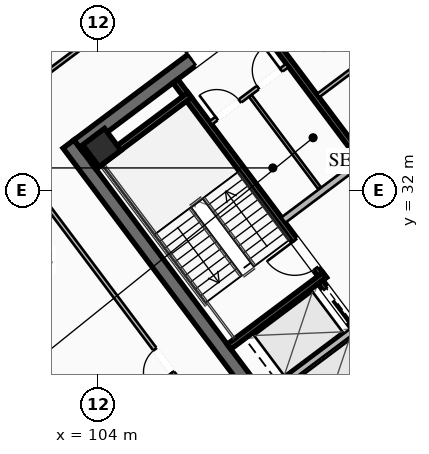
"""IFC4 building model, lengths in metres.
Left out: names, types, materials, properties, quantities, classifications, styles, units other than length and angle.
Written with IfcOpenShell. Run it as: python <this file> out.ifc"""

import sys

from ifc_helpers import new_model, si_unit, direction, frame, frame_2d, origin, origin_2d, place, context, subcontext, project, spatial, rectangle, hollow_rectangle, extrude, element, fill, save


model = new_model("IFC4")
c1 = context("Model", 3, precision=1e-05, world=origin(), true_north=direction((0.0, 1.0)))
c2 = subcontext(c1, "Body", "Model", "MODEL_VIEW")
j1 = project(units=[si_unit("LENGTHUNIT", "METRE"), si_unit("PLANEANGLEUNIT", "RADIAN")], contexts=[c1])
p1 = place(None, origin())
s1 = spatial("IfcSite", under=j1, at=p1, CompositionType="ELEMENT")
p2 = place(p1, origin())
s2 = spatial("IfcBuilding", under=s1, at=p2, CompositionType="ELEMENT")
p3 = place(p2, frame((0.0, 0.0, 255.4)))
s3 = spatial("IfcBuildingStorey", under=s2, at=p3, CompositionType="ELEMENT", Elevation=255.4)
p4 = place(p3, frame((112.396, 21.047, 0.0), z_axis=(0.0, 0.0, 1.0), x_axis=(-0.600005007985, 0.799996243986, 0.0)))
e1 = element("IfcWall", 1, at=p4, inside=s3, PredefinedType="SHEAR", context=c2, shape_type="SweptSolid", body=[
    extrude(rectangle(XDim=15.6, YDim=0.45, at=frame_2d((7.8, 0.0))), origin(), (0.0, 0.0, 1.0), 4.0),
])
p5 = place(p3, frame((103.351, 33.482, 0.0), z_axis=(0.0, 0.0, 1.0), x_axis=(0.8, 0.6, 0.0)))
e2 = element("IfcWall", 2, at=p5, inside=s3, PredefinedType="SHEAR", context=c2, shape_type="SweptSolid", body=[
    extrude(rectangle(XDim=15.26, YDim=0.45, at=frame_2d((7.63, 0.0))), origin(), (0.0, 0.0, 1.0), 4.0),
])
p6 = place(p5, frame((4.68, 0.0, 0.0)))
e3 = element("IfcOpeningElement", 3, at=p6, cuts=e2, PredefinedType="OPENING", context=c2, shape_type="SweptSolid", body=[
    extrude(rectangle(XDim=1.25, YDim=2.25, at=frame_2d((0.625, 1.125))), frame((0.0, 0.235, 0.0), z_axis=(0.0, -1.0, 0.0), x_axis=(1.0, 0.0, 0.0)), (0.0, 0.0, 1.0), 0.47),
])
p7 = place(p5, frame((9.73, 0.0, 0.0)))
e4 = element("IfcOpeningElement", 4, at=p7, cuts=e2, PredefinedType="OPENING", context=c2, shape_type="SweptSolid", body=[
    extrude(rectangle(XDim=1.25, YDim=2.25, at=frame_2d((0.625, 1.125))), frame((0.0, 0.235, 0.0), z_axis=(0.0, -1.0, 0.0), x_axis=(1.0, 0.0, 0.0)), (0.0, 0.0, 1.0), 0.47),
])
p8 = place(p3, frame((104.13, 33.41, 0.0), z_axis=(0.0, 0.0, 1.0), x_axis=(0.799999996291, 0.600000004945, 0.0)))
e5 = element("IfcColumn", 5, at=p8, inside=s3, PredefinedType="COLUMN", context=c2, shape_type="SweptSolid", body=[
    extrude(hollow_rectangle(XDim=0.9, YDim=0.9, WallThickness=0.04, at=origin_2d()), origin(), (0.0, 0.0, 1.0), 3.78),
])
p9 = place(p3, frame((111.44, 29.08, 0.0), z_axis=(0.0, 0.0, 1.0), x_axis=(-0.59999041401, 0.800007189403, 0.0)))
e6 = element("IfcWall", 6, at=p9, inside=s3, PredefinedType="SHEAR", context=c2, shape_type="SweptSolid", body=[
    extrude(rectangle(XDim=8.15, YDim=0.2, at=frame_2d((4.075, 0.0))), origin(), (0.0, 0.0, 1.0), 3.78),
])
p10 = place(p9, frame((0.45, 0.0, 0.0)))
e7 = element("IfcOpeningElement", 7, at=p10, cuts=e6, PredefinedType="OPENING", context=c2, shape_type="SweptSolid", body=[
    extrude(rectangle(XDim=1.15, YDim=2.2, at=frame_2d((0.575, 1.1))), frame((0.0, 0.11, 0.0), z_axis=(0.0, -1.0, 0.0), x_axis=(1.0, 0.0, 0.0)), (0.0, 0.0, 1.0), 0.22),
])
for number, where, z_axis, x_axis in (
    (8, (108.316, 26.862, 0.0), (0.0, 0.0, 1.0), (0.8, 0.6, 0.0)),
    (9, (103.876, 32.782, 0.0), (0.0, 0.0, 1.0), (0.8, 0.6, 0.0)),
):
    element("IfcWall", number, at=place(p3, frame(where, z_axis=z_axis, x_axis=x_axis)), inside=s3, PredefinedType="SHEAR", context=c2, shape_type="SweptSolid", body=[
        extrude(rectangle(XDim=3.93, YDim=0.2, at=frame_2d((1.965, 0.0))), origin(), (0.0, 0.0, 1.0), 3.78),
    ])
p11 = place(p3, frame((118.058, 25.856, 0.0), z_axis=(0.0, 0.0, 1.0), x_axis=(-0.600002657301, 0.799998007018, 0.0)))
e10 = element("IfcWall", 10, at=p11, inside=s3, PredefinedType="SHEAR", context=c2, shape_type="SweptSolid", body=[
    extrude(rectangle(XDim=14.7, YDim=0.2, at=frame_2d((7.35, 0.0))), origin(), (0.0, 0.0, 1.0), 3.78),
])
p12 = place(p3, frame((110.104, 31.028, 0.0), z_axis=(0.0, 0.0, 1.0), x_axis=(0.800018601094, 0.59997519774, 0.0)))
e11 = element("IfcWall", 11, at=p12, inside=s3, PredefinedType="SOLIDWALL", context=c2, shape_type="SweptSolid", body=[
    extrude(rectangle(XDim=3.15, YDim=0.22, at=frame_2d((1.575, 0.0))), origin(), (0.0, 0.0, 1.0), 2.971),
])
p13 = place(p3, frame((115.25, 23.75, 0.0), z_axis=(0.0, 0.0, 1.0), x_axis=(-0.599994036198, 0.800004472816, 0.0)))
e12 = element("IfcWall", 12, at=p13, inside=s3, PredefinedType="SHEAR", context=c2, shape_type="SweptSolid", body=[
    extrude(rectangle(XDim=6.55, YDim=0.2, at=frame_2d((3.275, 0.0))), origin(), (0.0, 0.0, 1.0), 3.78),
])
p14 = place(p13, frame((4.975, 0.0, 0.0)))
e13 = element("IfcOpeningElement", 13, at=p14, cuts=e12, PredefinedType="OPENING", context=c2, shape_type="SweptSolid", body=[
    extrude(rectangle(XDim=1.3, YDim=2.25, at=frame_2d((0.65, 1.125))), frame((0.0, 0.11, 0.0), z_axis=(0.0, -1.0, 0.0), x_axis=(1.0, 0.0, 0.0)), (0.0, 0.0, 1.0), 0.22),
])
p15 = place(p13, frame((2.975, 0.0, 0.0)))
e14 = element("IfcOpeningElement", 14, at=p15, cuts=e12, PredefinedType="OPENING", context=c2, shape_type="SweptSolid", body=[
    extrude(rectangle(XDim=1.3, YDim=2.25, at=frame_2d((0.65, 1.125))), frame((0.0, 0.11, 0.0), z_axis=(0.0, -1.0, 0.0), x_axis=(1.0, 0.0, 0.0)), (0.0, 0.0, 1.0), 0.22),
])
p16 = place(p13, frame((0.775, 0.0, 0.0)))
e15 = element("IfcOpeningElement", 15, at=p16, cuts=e12, PredefinedType="OPENING", context=c2, shape_type="SweptSolid", body=[
    extrude(rectangle(XDim=1.3, YDim=2.25, at=frame_2d((0.65, 1.125))), frame((0.0, 0.11, 0.0), z_axis=(0.0, -1.0, 0.0), x_axis=(1.0, 0.0, 0.0)), (0.0, 0.0, 1.0), 0.22),
])
p17 = place(p3, frame((109.528, 25.246, 0.0), z_axis=(0.0, 0.0, 1.0), x_axis=(0.800008183455, 0.599989088572, 0.0)))
e16 = element("IfcWall", 16, at=p17, inside=s3, PredefinedType="SOLIDWALL", context=c2, shape_type="SweptSolid", body=[
    extrude(rectangle(XDim=3.58, YDim=0.2, at=frame_2d((1.79, 0.0))), origin(), (0.0, 0.0, 1.0), 3.78),
])
p18 = place(p3, frame((107.71, 34.22, 0.0), z_axis=(0.0, 0.0, 1.0), x_axis=(0.799981399002, 0.60002480053, 0.0)))
e17 = element("IfcWall", 17, at=p18, inside=s3, PredefinedType="PARTITIONING", context=c2, shape_type="SweptSolid", body=[
    extrude(rectangle(XDim=3.15, YDim=0.135, at=frame_2d((1.575, 0.0))), origin(), (0.0, 0.0, 1.0), 2.971),
])
p19 = place(p18, frame((0.25, 0.0, 0.0)))
e18 = element("IfcOpeningElement", 18, at=p19, cuts=e17, PredefinedType="OPENING", context=c2, shape_type="SweptSolid", body=[
    extrude(rectangle(XDim=0.95, YDim=2.05, at=frame_2d((0.475, 1.025))), frame((0.0, 0.077, 0.0), z_axis=(0.0, -1.0, 0.0), x_axis=(1.0, 0.0, 0.0)), (0.0, 0.0, 1.0), 0.155),
])
p20 = place(p18, frame((1.95, 0.0, 0.0)))
e19 = element("IfcOpeningElement", 19, at=p20, cuts=e17, PredefinedType="OPENING", context=c2, shape_type="SweptSolid", body=[
    extrude(rectangle(XDim=0.95, YDim=2.05, at=frame_2d((0.475, 1.025))), frame((0.0, 0.077, 0.0), z_axis=(0.0, -1.0, 0.0), x_axis=(1.0, 0.0, 0.0)), (0.0, 0.0, 1.0), 0.155),
])
p21 = place(p3, frame((111.296, 32.072, 0.0), z_axis=(0.0, 0.0, 1.0), x_axis=(-0.59995887973, 0.800030838552, 0.0)))
e20 = element("IfcWall", 20, at=p21, inside=s3, PredefinedType="PARTITIONING", context=c2, shape_type="SweptSolid", body=[
    extrude(rectangle(XDim=3.8, YDim=0.11, at=frame_2d((1.9, 0.0))), origin(), (0.0, 0.0, 1.0), 2.971),
])
p22 = place(p3, frame((115.11, 33.27, 0.0), z_axis=(0.0, 0.0, 1.0), x_axis=(-0.600011160345, 0.79999162962, 0.0)))
e21 = element("IfcWall", 21, at=p22, inside=s3, PredefinedType="SOLIDWALL", context=c2, shape_type="SweptSolid", body=[
    extrude(rectangle(XDim=7.0, YDim=0.2, at=frame_2d((3.5, 0.0))), origin(), (0.0, 0.0, 1.0), 2.971),
])
p23 = place(p22, frame((0.85, 0.0, 0.0)))
e22 = element("IfcOpeningElement", 22, at=p23, cuts=e21, PredefinedType="OPENING", context=c2, shape_type="SweptSolid", body=[
    extrude(rectangle(XDim=0.95, YDim=2.05, at=frame_2d((0.475, 1.025))), frame((0.0, 0.11, 0.0), z_axis=(0.0, -1.0, 0.0), x_axis=(1.0, 0.0, 0.0)), (0.0, 0.0, 1.0), 0.22),
])
p24 = place(p22, frame((4.85, 0.0, 0.0)))
e23 = element("IfcOpeningElement", 23, at=p24, cuts=e21, PredefinedType="OPENING", context=c2, shape_type="SweptSolid", body=[
    extrude(rectangle(XDim=0.95, YDim=2.05, at=frame_2d((0.475, 1.025))), frame((0.0, 0.11, 0.0), z_axis=(0.0, -1.0, 0.0), x_axis=(1.0, 0.0, 0.0)), (0.0, 0.0, 1.0), 0.22),
])
p25 = place(p3, frame((111.246, 35.122, 0.0), z_axis=(0.0, 0.0, 1.0), x_axis=(0.8, 0.6, 0.0)))
e24 = element("IfcWall", 24, at=p25, inside=s3, PredefinedType="PARTITIONING", context=c2, shape_type="SweptSolid", body=[
    extrude(rectangle(XDim=1.88, YDim=0.135, at=frame_2d((0.94, 0.0))), origin(), (0.0, 0.0, 1.0), 2.971),
])
p26 = place(p3, frame((100.236, 34.302, 0.0), z_axis=(0.0, 0.0, 1.0), x_axis=(0.799997393501, 0.600003475316, 0.0)))
e25 = element("IfcWall", 25, at=p26, inside=s3, PredefinedType="PARTITIONING", context=c2, shape_type="SweptSolid", body=[
    extrude(rectangle(XDim=22.48, YDim=0.135, at=frame_2d((11.24, 0.0))), origin(), (0.0, 0.0, 1.0), 2.971),
])
p27 = place(p26, frame((0.3, 0.0, 0.0)))
e26 = element("IfcOpeningElement", 26, at=p27, cuts=e25, PredefinedType="OPENING", context=c2, shape_type="SweptSolid", body=[
    extrude(rectangle(XDim=0.95, YDim=2.05, at=frame_2d((0.475, 1.025))), frame((0.0, 0.077, 0.0), z_axis=(0.0, -1.0, 0.0), x_axis=(1.0, 0.0, 0.0)), (0.0, 0.0, 1.0), 0.155),
])
p28 = place(p26, frame((21.23, 0.0, 0.0)))
e27 = element("IfcOpeningElement", 27, at=p28, cuts=e25, PredefinedType="OPENING", context=c2, shape_type="SweptSolid", body=[
    extrude(rectangle(XDim=0.95, YDim=2.05, at=frame_2d((0.475, 1.025))), frame((0.0, 0.077, 0.0), z_axis=(0.0, -1.0, 0.0), x_axis=(1.0, 0.0, 0.0)), (0.0, 0.0, 1.0), 0.155),
])
p29 = place(p3, frame((123.262, 26.984, 0.0), z_axis=(0.0, 0.0, 1.0), x_axis=(-0.799997911818, -0.600002784232, 0.0)))
e28 = element("IfcWall", 28, at=p29, inside=s3, PredefinedType="PARTITIONING", context=c2, shape_type="SweptSolid", body=[
    extrude(rectangle(XDim=14.03, YDim=0.135, at=frame_2d((7.015, 0.0))), origin(), (0.0, 0.0, 1.0), 2.971),
])
p30 = place(p29, frame((4.18, 0.0, 0.0)))
e29 = element("IfcOpeningElement", 29, at=p30, cuts=e28, PredefinedType="OPENING", context=c2, shape_type="SweptSolid", body=[
    extrude(rectangle(XDim=0.95, YDim=2.05, at=frame_2d((0.475, 1.025))), frame((0.0, 0.077, 0.0), z_axis=(0.0, -1.0, 0.0), x_axis=(1.0, 0.0, 0.0)), (0.0, 0.0, 1.0), 0.155),
])
p31 = place(p29, frame((2.47, 0.0, 0.0)))
e30 = element("IfcOpeningElement", 30, at=p31, cuts=e28, PredefinedType="OPENING", context=c2, shape_type="SweptSolid", body=[
    extrude(rectangle(XDim=0.95, YDim=2.05, at=frame_2d((0.475, 1.025))), frame((0.0, 0.077, 0.0), z_axis=(0.0, -1.0, 0.0), x_axis=(1.0, 0.0, 0.0)), (0.0, 0.0, 1.0), 0.155),
])
p32 = place(p3, frame((111.99, 18.63, 0.0), z_axis=(0.0, 0.0, 1.0), x_axis=(-0.599997997836, 0.800001501619, 0.0)))
e31 = element("IfcWall", 31, at=p32, inside=s3, PredefinedType="PARTITIONING", context=c2, shape_type="SweptSolid", body=[
    extrude(rectangle(XDim=19.51, YDim=0.135, at=frame_2d((9.755, 0.0))), origin(), (0.0, 0.0, 1.0), 2.971),
])
p33 = place(p32, frame((0.3, 0.0, 0.0)))
e32 = element("IfcOpeningElement", 32, at=p33, cuts=e31, PredefinedType="OPENING", context=c2, shape_type="SweptSolid", body=[
    extrude(rectangle(XDim=0.95, YDim=2.05, at=frame_2d((0.475, 1.025))), frame((0.0, 0.077, 0.0), z_axis=(0.0, -1.0, 0.0), x_axis=(1.0, 0.0, 0.0)), (0.0, 0.0, 1.0), 0.155),
])
p34 = place(p32, frame((9.232, 0.0, 0.0)))
e33 = element("IfcOpeningElement", 33, at=p34, cuts=e31, PredefinedType="OPENING", context=c2, shape_type="SweptSolid", body=[
    extrude(rectangle(XDim=0.95, YDim=2.05, at=frame_2d((0.475, 1.025))), frame((0.0, 0.077, 0.0), z_axis=(0.0, -1.0, 0.0), x_axis=(1.0, 0.0, 0.0)), (0.0, 0.0, 1.0), 0.155),
])
p35 = place(p6, origin())
e34 = element("IfcDoor", 34, at=p35, inside=s3, OperationType="SINGLE_SWING_LEFT", PredefinedType="DOOR", context=c2, shape_type="SweptSolid", body=[
    extrude(rectangle(XDim=1.25, YDim=2.25, at=frame_2d((0.625, 1.125))), frame((0.0, 0.025, 0.0), z_axis=(0.0, -1.0, 0.0), x_axis=(1.0, 0.0, 0.0)), (0.0, 0.0, 1.0), 0.05),
])
fill(e3, e34)
p36 = place(p10, origin())
e35 = element("IfcDoor", 35, at=p36, inside=s3, OperationType="SINGLE_SWING_RIGHT", PredefinedType="DOOR", context=c2, shape_type="SweptSolid", body=[
    extrude(rectangle(XDim=1.15, YDim=2.2, at=frame_2d((0.575, 1.1))), frame((0.0, 0.025, 0.0), z_axis=(0.0, -1.0, 0.0), x_axis=(1.0, 0.0, 0.0)), (0.0, 0.0, 1.0), 0.05),
])
fill(e7, e35)
p37 = place(p19, origin())
e36 = element("IfcDoor", 36, at=p37, inside=s3, OperationType="SINGLE_SWING_LEFT", PredefinedType="DOOR", context=c2, shape_type="SweptSolid", body=[
    extrude(rectangle(XDim=0.95, YDim=2.05, at=frame_2d((0.475, 1.025))), frame((0.0, 0.025, 0.0), z_axis=(0.0, -1.0, 0.0), x_axis=(1.0, 0.0, 0.0)), (0.0, 0.0, 1.0), 0.05),
])
fill(e18, e36)
p38 = place(p20, origin())
e37 = element("IfcDoor", 37, at=p38, inside=s3, OperationType="SINGLE_SWING_RIGHT", PredefinedType="DOOR", context=c2, shape_type="SweptSolid", body=[
    extrude(rectangle(XDim=0.95, YDim=2.05, at=frame_2d((0.475, 1.025))), frame((0.0, 0.025, 0.0), z_axis=(0.0, -1.0, 0.0), x_axis=(1.0, 0.0, 0.0)), (0.0, 0.0, 1.0), 0.05),
])
fill(e19, e37)
p39 = place(p34, origin())
e38 = element("IfcDoor", 38, at=p39, inside=s3, OperationType="SINGLE_SWING_LEFT", PredefinedType="DOOR", context=c2, shape_type="SweptSolid", body=[
    extrude(rectangle(XDim=0.95, YDim=2.05, at=frame_2d((0.475, 1.025))), frame((0.0, 0.025, 0.0), z_axis=(0.0, -1.0, 0.0), x_axis=(1.0, 0.0, 0.0)), (0.0, 0.0, 1.0), 0.05),
])
fill(e33, e38)
p40 = place(p14, origin())
e39 = element("IfcDoor", 39, at=p40, inside=s3, OperationType="SLIDING_TO_LEFT", PredefinedType="DOOR", context=c2, shape_type="SweptSolid", body=[
    extrude(rectangle(XDim=1.3, YDim=2.25, at=frame_2d((0.65, 1.125))), frame((0.0, 0.025, 0.0), z_axis=(0.0, -1.0, 0.0), x_axis=(1.0, 0.0, 0.0)), (0.0, 0.0, 1.0), 0.05),
])
fill(e13, e39)
save(model, sys.argv[1])
